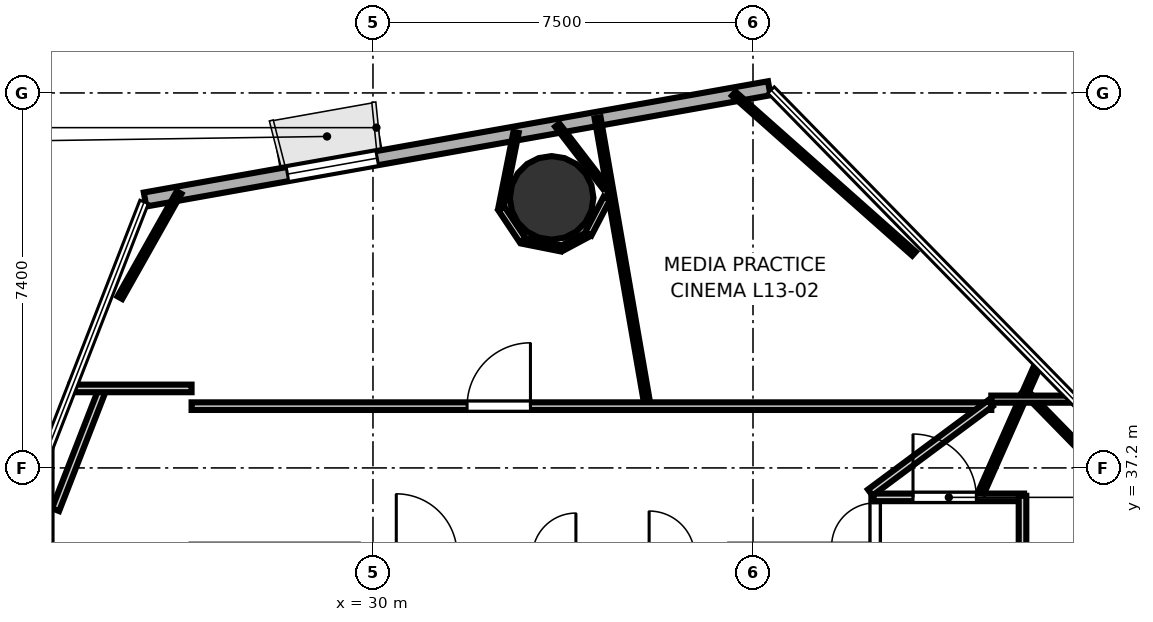
"""IFC4 building model, lengths in metres.
Left out: names, types, materials, properties, quantities, classifications, styles, units other than length and angle.
Written with IfcOpenShell. Run it as: python <this file> out.ifc"""

import sys

from ifc_helpers import new_model, si_unit, direction, frame, frame_2d, origin, origin_2d, place, context, subcontext, project, spatial, rectangle, hollow_circle, extrude, element, fill, save


model = new_model("IFC4")
c1 = context("Model", 3, precision=1e-05, world=origin(), true_north=direction((0.0, 1.0)))
c2 = subcontext(c1, "Body", "Model", "MODEL_VIEW")
j1 = project(units=[si_unit("LENGTHUNIT", "METRE"), si_unit("PLANEANGLEUNIT", "RADIAN")], contexts=[c1])
p1 = place(None, origin())
s1 = spatial("IfcSite", under=j1, at=p1, CompositionType="ELEMENT")
p2 = place(p1, origin())
s2 = spatial("IfcBuilding", under=s1, at=p2, CompositionType="ELEMENT")
p3 = place(p2, frame((0.0, 0.0, 56.2)))
s3 = spatial("IfcBuildingStorey", under=s2, at=p3, CompositionType="ELEMENT", Elevation=56.2)
p4 = place(p3, frame((33.526, 42.529, 0.0), z_axis=(0.0, 0.0, 1.0), x_axis=(1.0, 0.0, 0.0)))
e1 = element("IfcColumn", 1, at=p4, inside=s3, PredefinedType="COLUMN", context=c2, shape_type="SweptSolid", body=[
    extrude(hollow_circle(Radius=0.825, WallThickness=0.04, at=origin_2d()), origin(), (0.0, 0.0, 1.0), 3.7),
])
p5 = place(p3, frame((37.821, 44.692, 0.0), z_axis=(0.0, 0.0, 1.0), x_axis=(-0.984485525456, -0.175465809113, 0.0)))
e2 = element("IfcWall", 2, at=p5, inside=s3, PredefinedType="SOLIDWALL", context=c2, shape_type="SweptSolid", body=[
    extrude(rectangle(XDim=12.513, YDim=0.28, at=frame_2d((6.256, 0.0))), origin(), (0.0, 0.0, 1.0), 3.52),
])
p6 = place(p5, frame((7.859, 0.0, 0.85)))
e3 = element("IfcOpeningElement", 3, at=p6, cuts=e2, PredefinedType="OPENING", context=c2, shape_type="SweptSolid", body=[
    extrude(rectangle(XDim=1.8, YDim=2.1, at=frame_2d((0.9, 1.05))), frame((0.0, 0.15, 0.0), z_axis=(0.0, -1.0, 0.0), x_axis=(1.0, 0.0, 0.0)), (0.0, 0.0, 1.0), 0.3),
])
p7 = place(p3, frame((39.911, 32.64, 0.0), z_axis=(0.0, 0.0, 1.0), x_axis=(0.0, 1.0, 0.0)))
e4 = element("IfcWall", 4, at=p7, inside=s3, PredefinedType="PARTITIONING", context=c2, shape_type="SweptSolid", body=[
    extrude(rectangle(XDim=4.01, YDim=0.15, at=frame_2d((2.005, 0.0))), origin(), (0.0, 0.0, 1.0), 2.84),
])
p8 = place(p7, frame((3.01, 0.0, 0.0)))
e5 = element("IfcOpeningElement", 5, at=p8, cuts=e4, PredefinedType="OPENING", context=c2, shape_type="SweptSolid", body=[
    extrude(rectangle(XDim=0.86, YDim=2.05, at=frame_2d((0.43, 1.025))), frame((0.0, 0.085, 0.0), z_axis=(0.0, -1.0, 0.0), x_axis=(1.0, 0.0, 0.0)), (0.0, 0.0, 1.0), 0.17),
])
p9 = place(p3, frame((39.88, 36.619, 0.0), z_axis=(0.0, 0.0, 1.0), x_axis=(1.0, 0.0, 0.0)))
e6 = element("IfcWall", 6, at=p9, inside=s3, PredefinedType="PARTITIONING", context=c2, shape_type="SweptSolid", body=[
    extrude(rectangle(XDim=2.97, YDim=0.15, at=frame_2d((1.485, 0.0))), origin(), (0.0, 0.0, 1.0), 2.798),
])
p10 = place(p9, frame((0.778, 0.0, 0.0)))
e7 = element("IfcOpeningElement", 7, at=p10, cuts=e6, PredefinedType="OPENING", context=c2, shape_type="SweptSolid", body=[
    extrude(rectangle(XDim=1.25, YDim=2.2, at=frame_2d((0.625, 1.1))), frame((0.0, 0.085, 0.0), z_axis=(0.0, -1.0, 0.0), x_axis=(1.0, 0.0, 0.0)), (0.0, 0.0, 1.0), 0.17),
])
p11 = place(p3, frame((42.819, 36.65, 0.0), z_axis=(0.0, 0.0, 1.0), x_axis=(0.0, -1.0, 0.0)))
e8 = element("IfcWall", 8, at=p11, inside=s3, PredefinedType="PARTITIONING", context=c2, shape_type="SweptSolid", body=[
    extrude(rectangle(XDim=1.17, YDim=0.15, at=frame_2d((0.585, 0.0))), origin(), (0.0, 0.0, 1.0), 2.798),
])
p12 = place(p3, frame((23.736, 36.375, 0.0), z_axis=(0.0, 0.0, 1.0), x_axis=(0.362842007319, 0.931850673512, 0.0)))
e9 = element("IfcWall", 9, at=p12, inside=s3, PredefinedType="PARTITIONING", context=c2, shape_type="SweptSolid", body=[
    extrude(rectangle(XDim=2.59, YDim=0.15, at=frame_2d((1.295, 0.0))), origin(), (0.0, 0.0, 1.0), 2.84),
])
p13 = place(p3, frame((24.03, 38.769, 0.0), z_axis=(0.0, 0.0, 1.0), x_axis=(1.0, 0.0, 0.0)))
e10 = element("IfcWall", 10, at=p13, inside=s3, PredefinedType="PARTITIONING", context=c2, shape_type="SweptSolid", body=[
    extrude(rectangle(XDim=2.39, YDim=0.15, at=frame_2d((1.195, 0.0))), origin(), (0.0, 0.0, 1.0), 2.84),
])
p14 = place(p3, frame((26.42, 38.419, 0.0), z_axis=(0.0, 0.0, 1.0), x_axis=(1.0, 0.0, 0.0)))
e11 = element("IfcWall", 11, at=p14, inside=s3, PredefinedType="PARTITIONING", context=c2, shape_type="SweptSolid", body=[
    extrude(rectangle(XDim=15.783, YDim=0.15, at=frame_2d((7.892, 0.0))), origin(), (0.0, 0.0, 1.0), 2.798),
])
p15 = place(p14, frame((5.438, 0.0, 0.0)))
e12 = element("IfcOpeningElement", 12, at=p15, cuts=e11, PredefinedType="OPENING", context=c2, shape_type="SweptSolid", body=[
    extrude(rectangle(XDim=1.25, YDim=2.2, at=frame_2d((0.625, 1.1))), frame((0.0, 0.085, 0.0), z_axis=(0.0, -1.0, 0.0), x_axis=(1.0, 0.0, 0.0)), (0.0, 0.0, 1.0), 0.17),
])
p16 = place(p3, frame((42.185, 38.475, 0.0), z_axis=(0.0, 0.0, 1.0), x_axis=(-0.802818467394, -0.596223538961, 0.0)))
e13 = element("IfcWall", 13, at=p16, inside=s3, PredefinedType="PARTITIONING", context=c2, shape_type="SweptSolid", body=[
    extrude(rectangle(XDim=2.953, YDim=0.15, at=frame_2d((1.477, 0.0))), origin(), (0.0, 0.0, 1.0), 2.798),
])
p17 = place(p3, frame((42.005, 36.717, 0.0), z_axis=(0.0, 0.0, 1.0), x_axis=(0.405063455742, 0.914288574151, 0.0)))
e14 = element("IfcWall", 14, at=p17, inside=s3, PredefinedType="PARTITIONING", context=c2, shape_type="SweptSolid", body=[
    extrude(rectangle(XDim=2.803, YDim=0.12, at=frame_2d((1.402, 0.0))), origin(), (0.0, 0.0, 1.0), 2.798),
])
p18 = place(p3, frame((42.849, 38.728, 0.0), z_axis=(0.0, 0.0, 1.0), x_axis=(0.699253855462, -0.714873447276, 0.0)))
e15 = element("IfcWall", 15, at=p18, inside=s3, PredefinedType="PARTITIONING", context=c2, shape_type="SweptSolid", body=[
    extrude(rectangle(XDim=12.114, YDim=0.105, at=frame_2d((6.057, 0.0))), origin(), (0.0, 0.0, 1.0), 2.798),
])
p19 = place(p3, frame((37.121, 44.584, 0.0), z_axis=(0.0, 0.0, 1.0), x_axis=(0.748029411427, -0.663665578164, 0.0)))
e16 = element("IfcWall", 16, at=p19, inside=s3, PredefinedType="PARTITIONING", context=c2, shape_type="SweptSolid", body=[
    extrude(rectangle(XDim=4.755, YDim=0.105, at=frame_2d((2.377, 0.0))), origin(), (0.0, 0.0, 1.0), 2.84),
])
p20 = place(p3, frame((43.842, 38.557, 0.0), z_axis=(0.0, 0.0, 1.0), x_axis=(-0.999999822529, 0.000595769927, 0.0)))
e17 = element("IfcWall", 17, at=p20, inside=s3, PredefinedType="PARTITIONING", context=c2, shape_type="SweptSolid", body=[
    extrude(rectangle(XDim=1.639, YDim=0.14, at=frame_2d((0.82, 0.0))), origin(), (0.0, 0.0, 1.0), 2.84),
])
p21 = place(p3, frame((35.4, 38.535, 0.0), z_axis=(0.0, 0.0, 1.0), x_axis=(-0.170904038855, 0.98528767855, 0.0)))
e18 = element("IfcWall", 18, at=p21, inside=s3, PredefinedType="PARTITIONING", context=c2, shape_type="SweptSolid", body=[
    extrude(rectangle(XDim=5.657, YDim=0.12, at=frame_2d((2.829, 0.0))), origin(), (0.0, 0.0, 1.0), 2.798),
])
p22 = place(p3, frame((25.005, 40.56, 0.0), z_axis=(0.0, 0.0, 1.0), x_axis=(0.490850312815, 0.871243921304, 0.0)))
e19 = element("IfcWall", 19, at=p22, inside=s3, PredefinedType="PARTITIONING", context=c2, shape_type="SweptSolid", body=[
    extrude(rectangle(XDim=2.38, YDim=0.105, at=frame_2d((1.19, 0.0))), origin(), (0.0, 0.0, 1.0), 2.84),
])
p23 = place(p3, frame((34.583, 42.737, 0.0), z_axis=(0.0, 0.0, 1.0), x_axis=(-0.609634629106, 0.792682546165, 0.0)))
e20 = element("IfcWall", 20, at=p23, inside=s3, PredefinedType="PARTITIONING", context=c2, shape_type="SweptSolid", body=[
    extrude(rectangle(XDim=1.55, YDim=0.105, at=frame_2d((0.775, 0.0))), origin(), (0.0, 0.0, 1.0), 2.84),
])
p24 = place(p3, frame((32.823, 43.821, 0.0), z_axis=(0.0, 0.0, 1.0), x_axis=(-0.195087740914, -0.980785793813, 0.0)))
e21 = element("IfcWall", 21, at=p24, inside=s3, PredefinedType="PARTITIONING", context=c2, shape_type="SweptSolid", body=[
    extrude(rectangle(XDim=1.507, YDim=0.105, at=frame_2d((0.753, 0.0))), origin(), (0.0, 0.0, 1.0), 2.84),
])
p25 = place(p3, frame((32.534, 42.32, 0.0), z_axis=(0.0, 0.0, 1.0), x_axis=(0.555522182913, -0.831501716349, 0.0)))
e22 = element("IfcWall", 22, at=p25, inside=s3, PredefinedType="PARTITIONING", context=c2, shape_type="SweptSolid", body=[
    extrude(rectangle(XDim=0.754, YDim=0.14, at=frame_2d((0.377, 0.0))), origin(), (0.0, 0.0, 1.0), 2.798),
])
p26 = place(p3, frame((32.973, 41.68, 0.0), z_axis=(0.0, 0.0, 1.0), x_axis=(0.980754635727, -0.195244320021, 0.0)))
e23 = element("IfcWall", 23, at=p26, inside=s3, PredefinedType="PARTITIONING", context=c2, shape_type="SweptSolid", body=[
    extrude(rectangle(XDim=0.754, YDim=0.12, at=frame_2d((0.377, 0.0))), origin(), (0.0, 0.0, 1.0), 2.798),
])
p27 = place(p3, frame((33.733, 41.536, 0.0), z_axis=(0.0, 0.0, 1.0), x_axis=(0.881879626118, 0.471474628201, 0.0)))
e24 = element("IfcWall", 24, at=p27, inside=s3, PredefinedType="PARTITIONING", context=c2, shape_type="SweptSolid", body=[
    extrude(rectangle(XDim=0.572, YDim=0.105, at=frame_2d((0.286, 0.0))), origin(), (0.0, 0.0, 1.0), 2.84),
])
p28 = place(p3, frame((34.25, 41.818, 0.0), z_axis=(0.0, 0.0, 1.0), x_axis=(0.461285046472, 0.887251996843, 0.0)))
e25 = element("IfcWall", 25, at=p28, inside=s3, PredefinedType="PARTITIONING", context=c2, shape_type="SweptSolid", body=[
    extrude(rectangle(XDim=0.795, YDim=0.14, at=frame_2d((0.397, 0.0))), origin(), (0.0, 0.0, 1.0), 2.798),
])
p29 = place(p8, origin())
e26 = element("IfcDoor", 26, at=p29, inside=s3, OperationType="SINGLE_SWING_LEFT", PredefinedType="DOOR", context=c2, shape_type="SweptSolid", body=[
    extrude(rectangle(XDim=0.86, YDim=2.05, at=frame_2d((0.43, 1.025))), frame((0.0, 0.025, 0.0), z_axis=(0.0, -1.0, 0.0), x_axis=(1.0, 0.0, 0.0)), (0.0, 0.0, 1.0), 0.05),
])
fill(e5, e26)
p30 = place(p10, origin())
e27 = element("IfcDoor", 27, at=p30, inside=s3, OperationType="SINGLE_SWING_LEFT", PredefinedType="DOOR", context=c2, shape_type="SweptSolid", body=[
    extrude(rectangle(XDim=1.25, YDim=2.2, at=frame_2d((0.625, 1.1))), frame((0.0, 0.025, 0.0), z_axis=(0.0, -1.0, 0.0), x_axis=(1.0, 0.0, 0.0)), (0.0, 0.0, 1.0), 0.05),
])
fill(e7, e27)
p31 = place(p15, origin())
e28 = element("IfcDoor", 28, at=p31, inside=s3, OperationType="SINGLE_SWING_RIGHT", PredefinedType="DOOR", context=c2, shape_type="SweptSolid", body=[
    extrude(rectangle(XDim=1.25, YDim=2.2, at=frame_2d((0.625, 1.1))), frame((0.0, 0.025, 0.0), z_axis=(0.0, -1.0, 0.0), x_axis=(1.0, 0.0, 0.0)), (0.0, 0.0, 1.0), 0.05),
])
fill(e12, e28)
p32 = place(p6, origin())
e29 = element("IfcWindow", 29, at=p32, inside=s3, PartitioningType="SINGLE_PANEL", PredefinedType="WINDOW", context=c2, shape_type="SweptSolid", body=[
    extrude(rectangle(XDim=1.8, YDim=2.1, at=frame_2d((0.9, 1.05))), frame((0.0, 0.03, 0.0), z_axis=(0.0, -1.0, 0.0), x_axis=(1.0, 0.0, 0.0)), (0.0, 0.0, 1.0), 0.06),
])
fill(e3, e29)
save(model, sys.argv[1])
